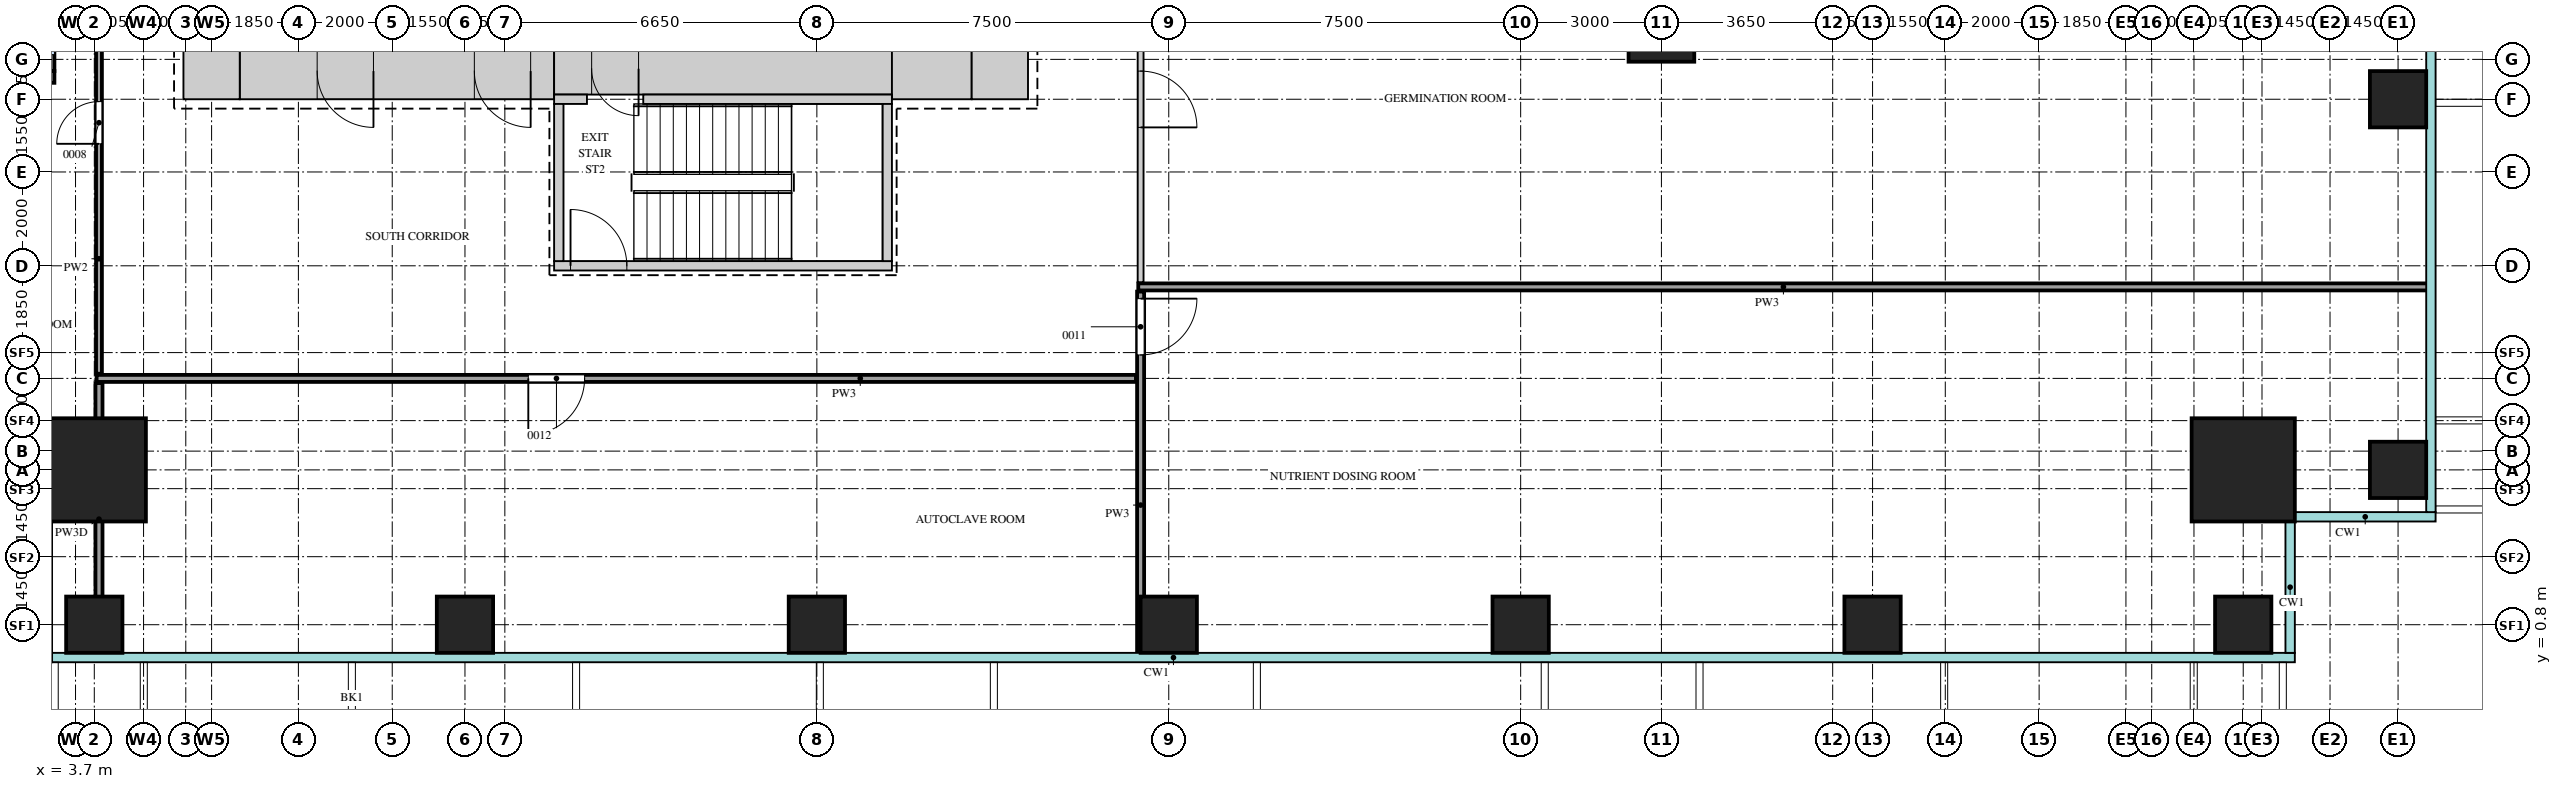
"""IFC4 building model, lengths in metres.
Left out: names, types, materials, properties, quantities, classifications, styles, units other than length and angle.
Written with IfcOpenShell. Run it as: python <this file> out.ifc"""

import sys

from ifc_helpers import new_model, si_unit, direction, frame, frame_2d, origin, origin_2d, place, context, subcontext, project, spatial, rectangle, extrude, source, transform, mapped, element, fill, save


model = new_model("IFC4")
c1 = context("Model", 3, precision=1e-05, world=origin(), true_north=direction((0.0, 1.0)))
c2 = subcontext(c1, "Body", "Model", "MODEL_VIEW")
j1 = project(units=[si_unit("LENGTHUNIT", "METRE"), si_unit("PLANEANGLEUNIT", "RADIAN")], contexts=[c1])
p1 = place(None, origin())
s1 = spatial("IfcSite", under=j1, at=p1, CompositionType="ELEMENT")
p2 = place(p1, origin())
s2 = spatial("IfcBuilding", under=s1, at=p2, CompositionType="ELEMENT")
p3 = place(p2, frame((0.0, 0.0, 46.5)))
s3 = spatial("IfcBuildingStorey", under=s2, at=p3, CompositionType="ELEMENT", Elevation=46.5)
m1 = source(origin(), c2, "Body", "SweptSolid", [
    extrude(rectangle(XDim=6.7, YDim=1.2, at=frame_2d((3.35, 0.0))), origin(), (0.0, 0.0, 1.0), 4.2),
])
p4 = place(p3, frame((7.2, 12.6, 0.0), z_axis=(0.0, 0.0, 1.0), x_axis=(1.0, 0.0, 0.0)))
e1 = element("IfcWall", 1, at=p4, inside=s3, PredefinedType="SHEAR", context=c2, shape_type="MappedRepresentation", body=[
    mapped(m1, transform((0.0, 0.0, 0.0))),
])
m2 = source(origin(), c2, "Body", "SweptSolid", [
    extrude(rectangle(XDim=1.2, YDim=2.1, at=frame_2d((0.6, 1.05))), frame((0.0, 0.61, 0.0), z_axis=(0.0, -1.0, 0.0), x_axis=(1.0, 0.0, 0.0)), (0.0, 0.0, 1.0), 1.22),
])
p5 = place(p4, frame((5.0, 0.0, 0.0)))
e2 = element("IfcOpeningElement", 2, at=p5, cuts=e1, PredefinedType="OPENING", context=c2, shape_type="MappedRepresentation", body=[
    mapped(m2, transform((0.0, 0.0, 0.0))),
])
p6 = place(p4, frame((1.65, 0.0, 0.0)))
e3 = element("IfcOpeningElement", 3, at=p6, cuts=e1, PredefinedType="OPENING", context=c2, shape_type="MappedRepresentation", body=[
    mapped(m2, transform((0.0, 0.0, 0.0))),
])
m3 = source(origin(), c2, "Body", "SweptSolid", [
    extrude(rectangle(XDim=7.2, YDim=1.1, at=frame_2d((3.6, 0.0))), origin(), (0.0, 0.0, 1.0), 4.2),
])
p7 = place(p3, frame((13.9, 12.65, 0.0), z_axis=(0.0, 0.0, 1.0), x_axis=(1.0, 0.0, 0.0)))
e4 = element("IfcWall", 4, at=p7, inside=s3, PredefinedType="SHEAR", context=c2, shape_type="MappedRepresentation", body=[
    mapped(m3, transform((0.0, 0.0, 0.0))),
])
m4 = source(origin(), c2, "Body", "SweptSolid", [
    extrude(rectangle(XDim=1.0, YDim=2.1, at=frame_2d((0.5, 1.05))), frame((0.0, 0.56, 0.0), z_axis=(0.0, -1.0, 0.0), x_axis=(1.0, 0.0, 0.0)), (0.0, 0.0, 1.0), 1.12),
])
p8 = place(p7, frame((0.8, 0.0, 0.0)))
e5 = element("IfcOpeningElement", 5, at=p8, cuts=e4, PredefinedType="OPENING", context=c2, shape_type="MappedRepresentation", body=[
    mapped(m4, transform((0.0, 0.0, 0.0))),
])
m5 = source(origin(), c2, "Body", "SweptSolid", [
    extrude(rectangle(XDim=1.7, YDim=1.2, at=frame_2d((0.85, 0.0))), origin(), (0.0, 0.0, 1.0), 4.2),
])
p9 = place(p3, frame((21.1, 12.6, 0.0), z_axis=(0.0, 0.0, 1.0), x_axis=(1.0, 0.0, 0.0)))
e6 = element("IfcWall", 6, at=p9, inside=s3, PredefinedType="SHEAR", context=c2, shape_type="MappedRepresentation", body=[
    mapped(m5, transform((0.0, 0.0, 0.0))),
])
m6 = source(origin(), c2, "Body", "SweptSolid", [
    extrude(rectangle(XDim=1.2, YDim=1.2, at=frame_2d((0.6, 0.0))), origin(), (0.0, 0.0, 1.0), 4.2),
])
for number, where, z_axis, x_axis in (
    (7, (22.8, 12.6, 0.0), (0.0, 0.0, 1.0), (1.0, 0.0, 0.0)),
    (8, (6.0, 12.6, 0.0), (0.0, 0.0, 1.0), (1.0, 0.0, 0.0)),
):
    element("IfcWall", number, at=place(p3, frame(where, z_axis=z_axis, x_axis=x_axis)), inside=s3, PredefinedType="SHEAR", context=c2, shape_type="MappedRepresentation", body=[
        mapped(m6, transform((0.0, 0.0, 0.0))),
    ])
m7 = source(origin(), c2, "Body", "SweptSolid", [
    extrude(rectangle(XDim=0.7, YDim=0.2, at=frame_2d((0.35, 0.0))), origin(), (0.0, 0.0, 1.0), 4.2),
])
p10 = place(p3, frame((13.9, 12.0, 0.0), z_axis=(0.0, 0.0, 1.0), x_axis=(1.0, 0.0, 0.0)))
e9 = element("IfcWall", 9, at=p10, inside=s3, PredefinedType="SHEAR", context=c2, shape_type="MappedRepresentation", body=[
    mapped(m7, transform((0.0, 0.0, 0.0))),
])
m8 = source(origin(), c2, "Body", "SweptSolid", [
    extrude(rectangle(XDim=5.3, YDim=0.2, at=frame_2d((2.65, 0.0))), origin(), (0.0, 0.0, 1.0), 4.2),
])
p11 = place(p3, frame((15.8, 12.0, 0.0), z_axis=(0.0, 0.0, 1.0), x_axis=(1.0, 0.0, 0.0)))
e10 = element("IfcWall", 10, at=p11, inside=s3, PredefinedType="SHEAR", context=c2, shape_type="MappedRepresentation", body=[
    mapped(m8, transform((0.0, 0.0, 0.0))),
])
m9 = source(origin(), c2, "Body", "SweptSolid", [
    extrude(rectangle(XDim=7.2, YDim=0.2, at=frame_2d((3.6, 0.0))), origin(), (0.0, 0.0, 1.0), 4.2),
])
p12 = place(p3, frame((13.9, 8.45, 0.0), z_axis=(0.0, 0.0, 1.0), x_axis=(1.0, 0.0, 0.0)))
e11 = element("IfcWall", 11, at=p12, inside=s3, PredefinedType="SHEAR", context=c2, shape_type="MappedRepresentation", body=[
    mapped(m9, transform((0.0, 0.0, 0.0))),
])
m10 = source(origin(), c2, "Body", "SweptSolid", [
    extrude(rectangle(XDim=1.2, YDim=2.1, at=frame_2d((0.6, 1.05))), frame((0.0, 0.11, 0.0), z_axis=(0.0, -1.0, 0.0), x_axis=(1.0, 0.0, 0.0)), (0.0, 0.0, 1.0), 0.22),
])
p13 = place(p12, frame((0.35, 0.0, 0.0)))
e12 = element("IfcOpeningElement", 12, at=p13, cuts=e11, PredefinedType="OPENING", context=c2, shape_type="MappedRepresentation", body=[
    mapped(m10, transform((0.0, 0.0, 0.0))),
])
m11 = source(origin(), c2, "Body", "SweptSolid", [
    extrude(rectangle(XDim=3.35, YDim=0.2, at=frame_2d((1.675, 0.0))), origin(), (0.0, 0.0, 1.0), 4.2),
])
for number, where, z_axis, x_axis in (
    (13, (21.0, 8.55, 0.0), (0.0, 0.0, 1.0), (0.0, 1.0, 0.0)),
    (14, (14.0, 8.55, 0.0), (0.0, 0.0, 1.0), (0.0, 1.0, 0.0)),
):
    element("IfcWall", number, at=place(p3, frame(where, z_axis=z_axis, x_axis=x_axis)), inside=s3, PredefinedType="SHEAR", context=c2, shape_type="MappedRepresentation", body=[
        mapped(m11, transform((0.0, 0.0, 0.0))),
    ])
m12 = source(origin(), c2, "Body", "SweptSolid", [
    extrude(rectangle(XDim=2.2, YDim=2.2, at=origin_2d()), origin(), (0.0, 0.0, 1.0), 4.5),
])
for number, where, z_axis, x_axis in (
    (15, (49.9, 4.1, 0.0), (0.0, 0.0, 1.0), (1.0, 0.0, 0.0)),
    (16, (4.1, 4.1, 0.0), (0.0, 0.0, 1.0), (1.0, 0.0, 0.0)),
):
    element("IfcColumn", number, at=place(p3, frame(where, z_axis=z_axis, x_axis=x_axis)), inside=s3, PredefinedType="COLUMN", context=c2, shape_type="MappedRepresentation", body=[
        mapped(m12, transform((0.0, 0.0, 0.0))),
    ])
m13 = source(origin(), c2, "Body", "SweptSolid", [
    extrude(rectangle(XDim=1.2, YDim=1.2, at=origin_2d()), origin(), (0.0, 0.0, 1.0), 4.2),
])
for number, where, z_axis, x_axis in (
    (17, (4.1, 0.8, 0.0), (0.0, 0.0, 1.0), (1.0, 0.0, 0.0)),
    (18, (12.0, 0.8, 0.0), (0.0, 0.0, 1.0), (1.0, 0.0, 0.0)),
    (19, (19.5, 0.8, 0.0), (0.0, 0.0, 1.0), (1.0, 0.0, 0.0)),
    (20, (27.0, 0.8, 0.0), (0.0, 0.0, 1.0), (1.0, 0.0, 0.0)),
    (21, (34.5, 0.8, 0.0), (0.0, 0.0, 1.0), (1.0, 0.0, 0.0)),
    (22, (42.0, 0.8, 0.0), (0.0, 0.0, 1.0), (1.0, 0.0, 0.0)),
    (23, (49.9, 0.8, 0.0), (0.0, 0.0, 1.0), (1.0, 0.0, 0.0)),
    (24, (53.2, 4.1, 0.0), (0.0, 0.0, 1.0), (1.0, 0.0, 0.0)),
    (25, (53.2, 12.0, 0.0), (0.0, 0.0, 1.0), (1.0, 0.0, 0.0)),
):
    element("IfcColumn", number, at=place(p3, frame(where, z_axis=z_axis, x_axis=x_axis)), inside=s3, PredefinedType="COLUMN", context=c2, shape_type="MappedRepresentation", body=[
        mapped(m13, transform((0.0, 0.0, 0.0))),
    ])
m14 = source(origin(), c2, "Body", "SweptSolid", [
    extrude(rectangle(XDim=1.4, YDim=1.4, at=origin_2d()), origin(), (0.0, 0.0, 1.0), 4.2),
])
p14 = place(p3, frame((37.5, 13.5, 0.0), z_axis=(0.0, 0.0, 1.0), x_axis=(1.0, 0.0, 0.0)))
e26 = element("IfcColumn", 26, at=p14, inside=s3, PredefinedType="COLUMN", context=c2, shape_type="MappedRepresentation", body=[
    mapped(m14, transform((0.0, 0.0, 0.0))),
])
m15 = source(origin(), c2, "Body", "SweptSolid", [
    extrude(rectangle(XDim=6.3, YDim=0.25, at=frame_2d((3.15, 0.0))), origin(), (0.0, 0.0, 1.0), 4.2),
])
p15 = place(p3, frame((3.125, 12.6, 0.0), z_axis=(0.0, 0.0, 1.0), x_axis=(0.0, 1.0, 0.0)))
e27 = element("IfcWall", 27, at=p15, inside=s3, PredefinedType="SOLIDWALL", context=c2, shape_type="MappedRepresentation", body=[
    mapped(m15, transform((0.0, 0.0, 0.0))),
])
m16 = source(origin(), c2, "Body", "SweptSolid", [
    extrude(rectangle(XDim=1.6, YDim=2.4, at=frame_2d((0.8, 1.2))), frame((0.0, 0.135, 0.0), z_axis=(0.0, -1.0, 0.0), x_axis=(1.0, 0.0, 0.0)), (0.0, 0.0, 1.0), 0.27),
])
p16 = place(p15, frame((0.35, 0.0, 0.0)))
e28 = element("IfcOpeningElement", 28, at=p16, cuts=e27, PredefinedType="OPENING", context=c2, shape_type="MappedRepresentation", body=[
    mapped(m16, transform((0.0, 0.0, 0.0))),
])
p17 = place(p15, frame((4.35, 0.0, 0.0)))
e29 = element("IfcOpeningElement", 29, at=p17, cuts=e27, PredefinedType="OPENING", context=c2, shape_type="MappedRepresentation", body=[
    mapped(m16, transform((0.0, 0.0, 0.0))),
])
m17 = source(origin(), c2, "Body", "SweptSolid", [
    extrude(rectangle(XDim=1.8, YDim=2.4, at=frame_2d((0.9, 1.2))), frame((0.0, 0.135, 0.0), z_axis=(0.0, -1.0, 0.0), x_axis=(1.0, 0.0, 0.0)), (0.0, 0.0, 1.0), 0.27),
])
p18 = place(p15, frame((2.25, 0.0, 0.0)))
e30 = element("IfcOpeningElement", 30, at=p18, cuts=e27, PredefinedType="OPENING", context=c2, shape_type="MappedRepresentation", body=[
    mapped(m17, transform((0.0, 0.0, 0.0))),
])
m18 = source(origin(), c2, "Body", "SweptSolid", [
    extrude(rectangle(XDim=1.85, YDim=0.25, at=frame_2d((0.925, 0.0))), origin(), (0.0, 0.0, 1.0), 3.9),
])
p19 = place(p3, frame((1.4, 12.475, 0.0), z_axis=(0.0, 0.0, 1.0), x_axis=(1.0, 0.0, 0.0)))
e31 = element("IfcWall", 31, at=p19, inside=s3, PredefinedType="SOLIDWALL", context=c2, shape_type="MappedRepresentation", body=[
    mapped(m18, transform((0.0, 0.0, 0.0))),
])
m19 = source(origin(), c2, "Body", "SweptSolid", [
    extrude(rectangle(XDim=5.8, YDim=0.15, at=frame_2d((2.9, 0.0))), origin(), (0.0, 0.0, 1.0), 3.6),
])
p20 = place(p3, frame((4.2, 0.15, 0.0), z_axis=(0.0, 0.0, 1.0), x_axis=(0.0, 1.0, 0.0)))
e32 = element("IfcWall", 32, at=p20, inside=s3, PredefinedType="PARTITIONING", context=c2, shape_type="MappedRepresentation", body=[
    mapped(m19, transform((0.0, 0.0, 0.0))),
])
m20 = source(origin(), c2, "Body", "SweptSolid", [
    extrude(rectangle(XDim=7.75, YDim=0.15, at=frame_2d((3.875, 0.0))), origin(), (0.0, 0.0, 1.0), 4.3),
])
p21 = place(p3, frame((26.4, 0.15, 0.0), z_axis=(0.0, 0.0, 1.0), x_axis=(0.0, 1.0, 0.0)))
e33 = element("IfcWall", 33, at=p21, inside=s3, PredefinedType="PARTITIONING", context=c2, shape_type="MappedRepresentation", body=[
    mapped(m20, transform((0.0, 0.0, 0.0))),
])
m21 = source(origin(), c2, "Body", "SweptSolid", [
    extrude(rectangle(XDim=1.2, YDim=2.1, at=frame_2d((0.6, 1.05))), frame((0.0, 0.085, 0.0), z_axis=(0.0, -1.0, 0.0), x_axis=(1.0, 0.0, 0.0)), (0.0, 0.0, 1.0), 0.17),
])
p22 = place(p21, frame((6.4, 0.0, 0.0)))
e34 = element("IfcOpeningElement", 34, at=p22, cuts=e33, PredefinedType="OPENING", context=c2, shape_type="MappedRepresentation", body=[
    mapped(m21, transform((0.0, 0.0, 0.0))),
])
m22 = source(origin(), c2, "Body", "SweptSolid", [
    extrude(rectangle(XDim=22.15, YDim=0.15, at=frame_2d((11.075, 0.0))), origin(), (0.0, 0.0, 1.0), 4.3),
])
p23 = place(p3, frame((4.15, 6.05, 0.0), z_axis=(0.0, 0.0, 1.0), x_axis=(1.0, 0.0, 0.0)))
e35 = element("IfcWall", 35, at=p23, inside=s3, PredefinedType="PARTITIONING", context=c2, shape_type="MappedRepresentation", body=[
    mapped(m22, transform((0.0, 0.0, 0.0))),
])
p24 = place(p23, frame((9.2, 0.0, 0.0)))
e36 = element("IfcOpeningElement", 36, at=p24, cuts=e35, PredefinedType="OPENING", context=c2, shape_type="MappedRepresentation", body=[
    mapped(m21, transform((0.0, 0.0, 0.0))),
])
m23 = source(origin(), c2, "Body", "SweptSolid", [
    extrude(rectangle(XDim=27.5, YDim=0.15, at=frame_2d((13.75, 0.0))), origin(), (0.0, 0.0, 1.0), 4.3),
])
p25 = place(p3, frame((26.35, 8.0, 0.0), z_axis=(0.0, 0.0, 1.0), x_axis=(1.0, 0.0, 0.0)))
e37 = element("IfcWall", 37, at=p25, inside=s3, PredefinedType="PARTITIONING", context=c2, shape_type="MappedRepresentation", body=[
    mapped(m23, transform((0.0, 0.0, 0.0))),
])
m24 = source(origin(), c2, "Body", "SweptSolid", [
    extrude(rectangle(XDim=27.1, YDim=0.125, at=frame_2d((13.55, 0.0))), origin(), (0.0, 0.0, 1.0), 4.3),
])
p26 = place(p3, frame((26.4, 8.1, 0.0), z_axis=(0.0, 0.0, 1.0), x_axis=(0.0, 1.0, 0.0)))
e38 = element("IfcWall", 38, at=p26, inside=s3, PredefinedType="PARTITIONING", context=c2, shape_type="MappedRepresentation", body=[
    mapped(m24, transform((0.0, 0.0, 0.0))),
])
m25 = source(origin(), c2, "Body", "SweptSolid", [
    extrude(rectangle(XDim=1.2, YDim=2.1, at=frame_2d((0.6, 1.05))), frame((0.0, 0.073, 0.0), z_axis=(0.0, -1.0, 0.0), x_axis=(1.0, 0.0, 0.0)), (0.0, 0.0, 1.0), 0.145),
])
p27 = place(p26, frame((3.3, 0.0, 0.0)))
e39 = element("IfcOpeningElement", 39, at=p27, cuts=e38, PredefinedType="OPENING", context=c2, shape_type="MappedRepresentation", body=[
    mapped(m25, transform((0.0, 0.0, 0.0))),
])
p28 = place(p26, frame((11.3, 0.0, 0.0)))
e40 = element("IfcOpeningElement", 40, at=p28, cuts=e38, PredefinedType="OPENING", context=c2, shape_type="MappedRepresentation", body=[
    mapped(m25, transform((0.0, 0.0, 0.0))),
])
m26 = source(origin(), c2, "Body", "SweptSolid", [
    extrude(rectangle(XDim=8.6, YDim=0.125, at=frame_2d((4.3, 0.0))), origin(), (0.0, 0.0, 1.0), 4.3),
])
p29 = place(p3, frame((4.2, 6.15, 0.0), z_axis=(0.0, 0.0, 1.0), x_axis=(0.0, 1.0, 0.0)))
e41 = element("IfcWall", 41, at=p29, inside=s3, PredefinedType="PARTITIONING", context=c2, shape_type="MappedRepresentation", body=[
    mapped(m26, transform((0.0, 0.0, 0.0))),
])
m27 = source(origin(), c2, "Body", "SweptSolid", [
    extrude(rectangle(XDim=0.9, YDim=2.1, at=frame_2d((0.45, 1.05))), frame((0.0, 0.073, 0.0), z_axis=(0.0, -1.0, 0.0), x_axis=(1.0, 0.0, 0.0)), (0.0, 0.0, 1.0), 0.145),
])
p30 = place(p29, frame((4.9, 0.0, 0.0)))
e42 = element("IfcOpeningElement", 42, at=p30, cuts=e41, PredefinedType="OPENING", context=c2, shape_type="MappedRepresentation", body=[
    mapped(m27, transform((0.0, 0.0, 0.0))),
])
m28 = source(origin(), c2, "Body", "SweptSolid", [
    extrude(rectangle(XDim=1.2, YDim=2.1, at=frame_2d((0.6, 1.05))), frame((0.0, 0.55, 0.0), z_axis=(0.0, -1.0, 0.0), x_axis=(1.0, 0.0, 0.0)), (0.0, 0.0, 1.0), 1.1),
])
p31 = place(p5, origin())
e43 = element("IfcDoor", 43, at=p31, inside=s3, OperationType="SINGLE_SWING_RIGHT", PredefinedType="DOOR", context=c2, shape_type="MappedRepresentation", body=[
    mapped(m28, transform((0.0, 0.0, 0.0))),
])
fill(e2, e43)
p32 = place(p6, origin())
e44 = element("IfcDoor", 44, at=p32, inside=s3, OperationType="SINGLE_SWING_RIGHT", PredefinedType="DOOR", context=c2, shape_type="MappedRepresentation", body=[
    mapped(m28, transform((0.0, 0.0, 0.0))),
])
fill(e3, e44)
m29 = source(origin(), c2, "Body", "SweptSolid", [
    extrude(rectangle(XDim=1.0, YDim=2.1, at=frame_2d((0.5, 1.05))), frame((0.0, 0.5, 0.0), z_axis=(0.0, -1.0, 0.0), x_axis=(1.0, 0.0, 0.0)), (0.0, 0.0, 1.0), 1.0),
])
p33 = place(p8, origin())
e45 = element("IfcDoor", 45, at=p33, inside=s3, OperationType="SINGLE_SWING_RIGHT", PredefinedType="DOOR", context=c2, shape_type="MappedRepresentation", body=[
    mapped(m29, transform((0.0, 0.0, 0.0))),
])
fill(e5, e45)
m30 = source(origin(), c2, "Body", "SweptSolid", [
    extrude(rectangle(XDim=1.2, YDim=2.1, at=frame_2d((0.6, 1.05))), frame((0.0, 0.025, 0.0), z_axis=(0.0, -1.0, 0.0), x_axis=(1.0, 0.0, 0.0)), (0.0, 0.0, 1.0), 0.05),
])
p34 = place(p22, origin())
e46 = element("IfcDoor", 46, at=p34, inside=s3, OperationType="SINGLE_SWING_RIGHT", PredefinedType="DOOR", context=c2, shape_type="MappedRepresentation", body=[
    mapped(m30, transform((0.0, 0.0, 0.0))),
])
fill(e34, e46)
p35 = place(p27, origin())
e47 = element("IfcDoor", 47, at=p35, inside=s3, OperationType="SINGLE_SWING_LEFT", PredefinedType="DOOR", context=c2, shape_type="MappedRepresentation", body=[
    mapped(m30, transform((0.0, 0.0, 0.0))),
])
fill(e39, e47)
m31 = source(origin(), c2, "Body", "SweptSolid", [
    extrude(rectangle(XDim=0.9, YDim=2.1, at=frame_2d((0.45, 1.05))), frame((0.0, 0.025, 0.0), z_axis=(0.0, -1.0, 0.0), x_axis=(1.0, 0.0, 0.0)), (0.0, 0.0, 1.0), 0.05),
])
p36 = place(p30, origin())
e48 = element("IfcDoor", 48, at=p36, inside=s3, OperationType="SINGLE_SWING_RIGHT", PredefinedType="DOOR", context=c2, shape_type="MappedRepresentation", body=[
    mapped(m31, transform((0.0, 0.0, 0.0))),
])
fill(e42, e48)
p37 = place(p24, origin())
e49 = element("IfcDoor", 49, at=p37, inside=s3, OperationType="SINGLE_SWING_LEFT", PredefinedType="DOOR", context=c2, shape_type="MappedRepresentation", body=[
    mapped(m30, transform((0.0, 0.0, 0.0))),
])
fill(e36, e49)
p38 = place(p13, origin())
e50 = element("IfcDoor", 50, at=p38, inside=s3, OperationType="SINGLE_SWING_RIGHT", PredefinedType="DOOR", context=c2, shape_type="MappedRepresentation", body=[
    mapped(m30, transform((0.0, 0.0, 0.0))),
])
fill(e12, e50)
save(model, sys.argv[1])
